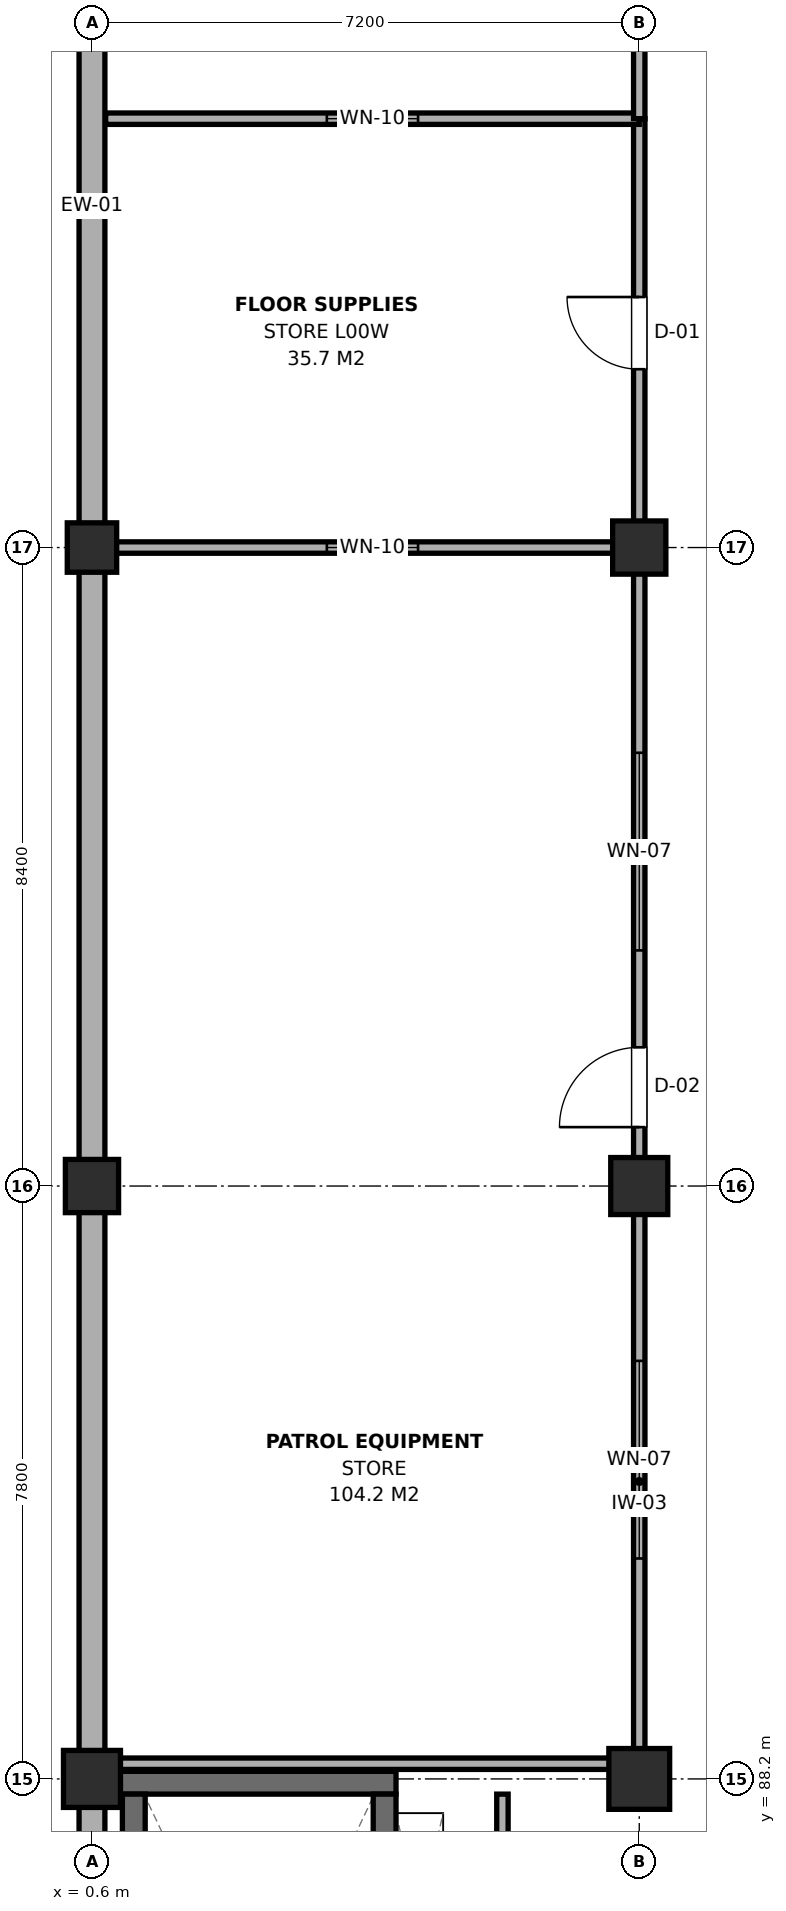
"""IFC4 building model, lengths in metres.
Left out: names, types, materials, properties, quantities, classifications, styles, units other than length and angle.
Written with IfcOpenShell. Run it as: python <this file> out.ifc"""

import sys

from ifc_helpers import new_model, si_unit, direction, frame, frame_2d, origin, origin_2d, place, context, subcontext, project, spatial, rectangle, extrude, element, fill, save


model = new_model("IFC4")
c1 = context("Model", 3, precision=1e-05, world=origin(), true_north=direction((0.0, 1.0)))
c2 = subcontext(c1, "Body", "Model", "MODEL_VIEW")
j1 = project(units=[si_unit("LENGTHUNIT", "METRE"), si_unit("PLANEANGLEUNIT", "RADIAN")], contexts=[c1])
p1 = place(None, origin())
s1 = spatial("IfcSite", under=j1, at=p1, CompositionType="ELEMENT")
p2 = place(p1, origin())
s2 = spatial("IfcBuilding", under=s1, at=p2, CompositionType="ELEMENT")
p3 = place(p2, origin())
s3 = spatial("IfcBuildingStorey", under=s2, at=p3, CompositionType="ELEMENT", Elevation=0.0)
p4 = place(p3, frame((0.6, 88.2, 0.0), z_axis=(0.0, 0.0, 1.0), x_axis=(1.0, 0.0, 0.0)))
e1 = element("IfcColumn", 1, at=p4, inside=s3, PredefinedType="COLUMN", context=c2, shape_type="SweptSolid", body=[
    extrude(rectangle(XDim=0.75, YDim=0.75, at=origin_2d()), origin(), (0.0, 0.0, 1.0), 4.8),
])
p5 = place(p3, frame((0.6, 96.0, 0.0), z_axis=(0.0, 0.0, 1.0), x_axis=(1.0, 0.0, 0.0)))
e2 = element("IfcColumn", 2, at=p5, inside=s3, PredefinedType="COLUMN", context=c2, shape_type="SweptSolid", body=[
    extrude(rectangle(XDim=0.7, YDim=0.7, at=origin_2d()), origin(), (0.0, 0.0, 1.0), 4.8),
])
p6 = place(p3, frame((0.6, 104.4, 0.0), z_axis=(0.0, 0.0, 1.0), x_axis=(1.0, 0.0, 0.0)))
e3 = element("IfcColumn", 3, at=p6, inside=s3, PredefinedType="COLUMN", context=c2, shape_type="SweptSolid", body=[
    extrude(rectangle(XDim=0.65, YDim=0.65, at=origin_2d()), origin(), (0.0, 0.0, 1.0), 4.8),
])
p7 = place(p3, frame((7.8, 88.2, 0.0), z_axis=(0.0, 0.0, 1.0), x_axis=(1.0, 0.0, 0.0)))
e4 = element("IfcColumn", 4, at=p7, inside=s3, PredefinedType="COLUMN", context=c2, shape_type="SweptSolid", body=[
    extrude(rectangle(XDim=0.8, YDim=0.8, at=origin_2d()), origin(), (0.0, 0.0, 1.0), 4.8),
])
p8 = place(p3, frame((7.8, 96.0, 0.0), z_axis=(0.0, 0.0, 1.0), x_axis=(1.0, 0.0, 0.0)))
e5 = element("IfcColumn", 5, at=p8, inside=s3, PredefinedType="COLUMN", context=c2, shape_type="SweptSolid", body=[
    extrude(rectangle(XDim=0.75, YDim=0.75, at=origin_2d()), origin(), (0.0, 0.0, 1.0), 4.8),
])
p9 = place(p3, frame((7.8, 104.4, 0.0), z_axis=(0.0, 0.0, 1.0), x_axis=(1.0, 0.0, 0.0)))
e6 = element("IfcColumn", 6, at=p9, inside=s3, PredefinedType="COLUMN", context=c2, shape_type="SweptSolid", body=[
    extrude(rectangle(XDim=0.7, YDim=0.7, at=origin_2d()), origin(), (0.0, 0.0, 1.0), 4.8),
])
p10 = place(p3, frame((0.75, 88.15, 0.0), z_axis=(0.0, 0.0, 1.0), x_axis=(1.0, 0.0, 0.0)))
e7 = element("IfcWall", 7, at=p10, inside=s3, PredefinedType="SHEAR", context=c2, shape_type="SweptSolid", body=[
    extrude(rectangle(XDim=3.85, YDim=0.3, at=frame_2d((1.925, 0.0))), origin(), (0.0, 0.0, 1.0), 4.56),
])
p11 = place(p3, frame((1.15, 81.6, 0.0), z_axis=(0.0, 0.0, 1.0), x_axis=(0.0, 1.0, 0.0)))
e8 = element("IfcWall", 8, at=p11, inside=s3, PredefinedType="SHEAR", context=c2, shape_type="SweptSolid", body=[
    extrude(rectangle(XDim=6.4, YDim=0.3, at=frame_2d((3.2, 0.0))), origin(), (0.0, 0.0, 1.0), 4.56),
])
p12 = place(p3, frame((4.45, 81.6, 0.0), z_axis=(0.0, 0.0, 1.0), x_axis=(0.0, 1.0, 0.0)))
e9 = element("IfcWall", 9, at=p12, inside=s3, PredefinedType="SHEAR", context=c2, shape_type="SweptSolid", body=[
    extrude(rectangle(XDim=6.4, YDim=0.3, at=frame_2d((3.2, 0.0))), origin(), (0.0, 0.0, 1.0), 4.56),
])
p13 = place(p12, frame((0.17, 0.0, 0.0)))
e10 = element("IfcOpeningElement", 10, at=p13, cuts=e9, PredefinedType="OPENING", context=c2, shape_type="SweptSolid", body=[
    extrude(rectangle(XDim=1.1, YDim=2.15, at=frame_2d((0.55, 1.075))), frame((0.0, 0.165, 0.0), z_axis=(0.0, -1.0, 0.0), x_axis=(1.0, 0.0, 0.0)), (0.0, 0.0, 1.0), 0.33),
])
p14 = place(p3, frame((0.6, 81.0, 0.0), z_axis=(0.0, 0.0, 1.0), x_axis=(0.0, 1.0, 0.0)))
e11 = element("IfcWall", 11, at=p14, inside=s3, PredefinedType="SOLIDWALL", context=c2, shape_type="SweptSolid", body=[
    extrude(rectangle(XDim=7.2, YDim=0.34, at=frame_2d((3.6, 0.0))), origin(), (0.0, 0.0, 1.0), 4.205),
])
p15 = place(p3, frame((0.6, 88.2, 0.0), z_axis=(0.0, 0.0, 1.0), x_axis=(0.0, 1.0, 0.0)))
e12 = element("IfcWall", 12, at=p15, inside=s3, PredefinedType="SOLIDWALL", context=c2, shape_type="SweptSolid", body=[
    extrude(rectangle(XDim=7.8, YDim=0.34, at=frame_2d((3.9, 0.0))), origin(), (0.0, 0.0, 1.0), 4.225),
])
p16 = place(p3, frame((0.6, 96.0, 0.0), z_axis=(0.0, 0.0, 1.0), x_axis=(0.0, 1.0, 0.0)))
e13 = element("IfcWall", 13, at=p16, inside=s3, PredefinedType="SOLIDWALL", context=c2, shape_type="SweptSolid", body=[
    extrude(rectangle(XDim=8.4, YDim=0.34, at=frame_2d((4.2, 0.0))), origin(), (0.0, 0.0, 1.0), 4.065),
])
p17 = place(p3, frame((0.6, 104.4, 0.0), z_axis=(0.0, 0.0, 1.0), x_axis=(0.0, 1.0, 0.0)))
e14 = element("IfcWall", 14, at=p17, inside=s3, PredefinedType="SOLIDWALL", context=c2, shape_type="SweptSolid", body=[
    extrude(rectangle(XDim=9.0, YDim=0.34, at=frame_2d((4.5, 0.0))), origin(), (0.0, 0.0, 1.0), 4.115),
])
p18 = place(p3, frame((6.0, 84.8, 0.0), z_axis=(0.0, 0.0, 1.0), x_axis=(0.0, 1.0, 0.0)))
e15 = element("IfcWall", 15, at=p18, inside=s3, PredefinedType="PARTITIONING", context=c2, shape_type="SweptSolid", body=[
    extrude(rectangle(XDim=3.2, YDim=0.15, at=frame_2d((1.6, 0.0))), origin(), (0.0, 0.0, 1.0), 4.105),
])
p19 = place(p18, frame((1.175, 0.0, 0.0)))
e16 = element("IfcOpeningElement", 16, at=p19, cuts=e15, PredefinedType="OPENING", context=c2, shape_type="SweptSolid", body=[
    extrude(rectangle(XDim=0.85, YDim=2.1, at=frame_2d((0.425, 1.05))), frame((0.0, 0.09, 0.0), z_axis=(0.0, -1.0, 0.0), x_axis=(1.0, 0.0, 0.0)), (0.0, 0.0, 1.0), 0.18),
])
p20 = place(p3, frame((7.8, 88.4, 0.0), z_axis=(0.0, 0.0, 1.0), x_axis=(0.0, 1.0, 0.0)))
e17 = element("IfcWall", 17, at=p20, inside=s3, PredefinedType="PARTITIONING", context=c2, shape_type="SweptSolid", body=[
    extrude(rectangle(XDim=16.0, YDim=0.15, at=frame_2d((8.0, 0.0))), origin(), (0.0, 0.0, 1.0), 4.065),
])
p21 = place(p20, frame((8.375, 0.0, 0.0)))
e18 = element("IfcOpeningElement", 18, at=p21, cuts=e17, PredefinedType="OPENING", context=c2, shape_type="SweptSolid", body=[
    extrude(rectangle(XDim=1.05, YDim=2.15, at=frame_2d((0.525, 1.075))), frame((0.0, 0.09, 0.0), z_axis=(0.0, -1.0, 0.0), x_axis=(1.0, 0.0, 0.0)), (0.0, 0.0, 1.0), 0.18),
])
p22 = place(p20, frame((2.7, 0.0, 0.95)))
e19 = element("IfcOpeningElement", 19, at=p22, cuts=e17, PredefinedType="OPENING", context=c2, shape_type="SweptSolid", body=[
    extrude(rectangle(XDim=2.6, YDim=1.5, at=frame_2d((1.3, 0.75))), frame((0.0, 0.09, 0.0), z_axis=(0.0, -1.0, 0.0), x_axis=(1.0, 0.0, 0.0)), (0.0, 0.0, 1.0), 0.18),
])
p23 = place(p20, frame((10.7, 0.0, 0.95)))
e20 = element("IfcOpeningElement", 20, at=p23, cuts=e17, PredefinedType="OPENING", context=c2, shape_type="SweptSolid", body=[
    extrude(rectangle(XDim=2.6, YDim=1.5, at=frame_2d((1.3, 0.75))), frame((0.0, 0.09, 0.0), z_axis=(0.0, -1.0, 0.0), x_axis=(1.0, 0.0, 0.0)), (0.0, 0.0, 1.0), 0.18),
])
p24 = place(p3, frame((0.78, 88.4, 0.0), z_axis=(0.0, 0.0, 1.0), x_axis=(1.0, 0.0, 0.0)))
e21 = element("IfcWall", 21, at=p24, inside=s3, PredefinedType="PARTITIONING", context=c2, shape_type="SweptSolid", body=[
    extrude(rectangle(XDim=7.02, YDim=0.15, at=frame_2d((3.51, 0.0))), origin(), (0.0, 0.0, 1.0), 4.105),
])
p25 = place(p3, frame((7.8, 104.4, 0.0), z_axis=(0.0, 0.0, 1.0), x_axis=(0.0, 1.0, 0.0)))
e22 = element("IfcWall", 22, at=p25, inside=s3, PredefinedType="PARTITIONING", context=c2, shape_type="SweptSolid", body=[
    extrude(rectangle(XDim=5.642, YDim=0.15, at=frame_2d((2.821, 0.0))), origin(), (0.0, 0.0, 1.0), 4.115),
])
p26 = place(p25, frame((2.346, 0.0, 0.0)))
e23 = element("IfcOpeningElement", 23, at=p26, cuts=e22, PredefinedType="OPENING", context=c2, shape_type="SweptSolid", body=[
    extrude(rectangle(XDim=0.95, YDim=2.15, at=frame_2d((0.475, 1.075))), frame((0.0, 0.09, 0.0), z_axis=(0.0, -1.0, 0.0), x_axis=(1.0, 0.0, 0.0)), (0.0, 0.0, 1.0), 0.18),
])
p27 = place(p3, frame((0.78, 110.042, 0.0), z_axis=(0.0, 0.0, 1.0), x_axis=(1.0, 0.0, 0.0)))
e24 = element("IfcWall", 24, at=p27, inside=s3, PredefinedType="PARTITIONING", context=c2, shape_type="SweptSolid", body=[
    extrude(rectangle(XDim=7.02, YDim=0.15, at=frame_2d((3.51, 0.0))), origin(), (0.0, 0.0, 1.0), 4.115),
])
p28 = place(p27, frame((2.91, 0.0, 0.95)))
e25 = element("IfcOpeningElement", 25, at=p28, cuts=e24, PredefinedType="OPENING", context=c2, shape_type="SweptSolid", body=[
    extrude(rectangle(XDim=1.2, YDim=1.5, at=frame_2d((0.6, 0.75))), frame((0.0, 0.09, 0.0), z_axis=(0.0, -1.0, 0.0), x_axis=(1.0, 0.0, 0.0)), (0.0, 0.0, 1.0), 0.18),
])
p29 = place(p3, frame((7.8, 110.042, 0.0), z_axis=(0.0, 0.0, 1.0), x_axis=(0.0, 1.0, 0.0)))
e26 = element("IfcWall", 26, at=p29, inside=s3, PredefinedType="PARTITIONING", context=c2, shape_type="SweptSolid", body=[
    extrude(rectangle(XDim=3.358, YDim=0.15, at=frame_2d((1.679, 0.0))), origin(), (0.0, 0.0, 1.0), 4.115),
])
p30 = place(p29, frame((1.229, 0.0, 0.0)))
e27 = element("IfcOpeningElement", 27, at=p30, cuts=e26, PredefinedType="OPENING", context=c2, shape_type="SweptSolid", body=[
    extrude(rectangle(XDim=0.9, YDim=2.15, at=frame_2d((0.45, 1.075))), frame((0.0, 0.09, 0.0), z_axis=(0.0, -1.0, 0.0), x_axis=(1.0, 0.0, 0.0)), (0.0, 0.0, 1.0), 0.18),
])
p31 = place(p3, frame((0.78, 104.4, 0.0), z_axis=(0.0, 0.0, 1.0), x_axis=(1.0, 0.0, 0.0)))
e28 = element("IfcWall", 28, at=p31, inside=s3, PredefinedType="PARTITIONING", context=c2, shape_type="SweptSolid", body=[
    extrude(rectangle(XDim=7.02, YDim=0.15, at=frame_2d((3.51, 0.0))), origin(), (0.0, 0.0, 1.0), 4.005),
])
p32 = place(p31, frame((2.91, 0.0, 0.95)))
e29 = element("IfcOpeningElement", 29, at=p32, cuts=e28, PredefinedType="OPENING", context=c2, shape_type="SweptSolid", body=[
    extrude(rectangle(XDim=1.2, YDim=1.5, at=frame_2d((0.6, 0.75))), frame((0.0, 0.09, 0.0), z_axis=(0.0, -1.0, 0.0), x_axis=(1.0, 0.0, 0.0)), (0.0, 0.0, 1.0), 0.18),
])
p33 = place(p21, origin())
e30 = element("IfcDoor", 30, at=p33, inside=s3, OperationType="SINGLE_SWING_LEFT", PredefinedType="DOOR", context=c2, shape_type="SweptSolid", body=[
    extrude(rectangle(XDim=1.05, YDim=2.15, at=frame_2d((0.525, 1.075))), frame((0.0, 0.025, 0.0), z_axis=(0.0, -1.0, 0.0), x_axis=(1.0, 0.0, 0.0)), (0.0, 0.0, 1.0), 0.05),
])
fill(e18, e30)
p34 = place(p22, origin())
e31 = element("IfcWindow", 31, at=p34, inside=s3, PartitioningType="SINGLE_PANEL", PredefinedType="WINDOW", context=c2, shape_type="SweptSolid", body=[
    extrude(rectangle(XDim=2.6, YDim=1.5, at=frame_2d((1.3, 0.75))), frame((0.0, 0.03, 0.0), z_axis=(0.0, -1.0, 0.0), x_axis=(1.0, 0.0, 0.0)), (0.0, 0.0, 1.0), 0.06),
])
fill(e19, e31)
p35 = place(p23, origin())
e32 = element("IfcWindow", 32, at=p35, inside=s3, PartitioningType="SINGLE_PANEL", PredefinedType="WINDOW", context=c2, shape_type="SweptSolid", body=[
    extrude(rectangle(XDim=2.6, YDim=1.5, at=frame_2d((1.3, 0.75))), frame((0.0, 0.03, 0.0), z_axis=(0.0, -1.0, 0.0), x_axis=(1.0, 0.0, 0.0)), (0.0, 0.0, 1.0), 0.06),
])
fill(e20, e32)
p36 = place(p26, origin())
e33 = element("IfcDoor", 33, at=p36, inside=s3, OperationType="SINGLE_SWING_RIGHT", PredefinedType="DOOR", context=c2, shape_type="SweptSolid", body=[
    extrude(rectangle(XDim=0.95, YDim=2.15, at=frame_2d((0.475, 1.075))), frame((0.0, 0.025, 0.0), z_axis=(0.0, -1.0, 0.0), x_axis=(1.0, 0.0, 0.0)), (0.0, 0.0, 1.0), 0.05),
])
fill(e23, e33)
p37 = place(p28, origin())
e34 = element("IfcWindow", 34, at=p37, inside=s3, PartitioningType="SINGLE_PANEL", PredefinedType="WINDOW", context=c2, shape_type="SweptSolid", body=[
    extrude(rectangle(XDim=1.2, YDim=1.5, at=frame_2d((0.6, 0.75))), frame((0.0, 0.03, 0.0), z_axis=(0.0, -1.0, 0.0), x_axis=(1.0, 0.0, 0.0)), (0.0, 0.0, 1.0), 0.06),
])
fill(e25, e34)
p38 = place(p32, origin())
e35 = element("IfcWindow", 35, at=p38, inside=s3, PartitioningType="SINGLE_PANEL", PredefinedType="WINDOW", context=c2, shape_type="SweptSolid", body=[
    extrude(rectangle(XDim=1.2, YDim=1.5, at=frame_2d((0.6, 0.75))), frame((0.0, 0.03, 0.0), z_axis=(0.0, -1.0, 0.0), x_axis=(1.0, 0.0, 0.0)), (0.0, 0.0, 1.0), 0.06),
])
fill(e29, e35)
save(model, sys.argv[1])
